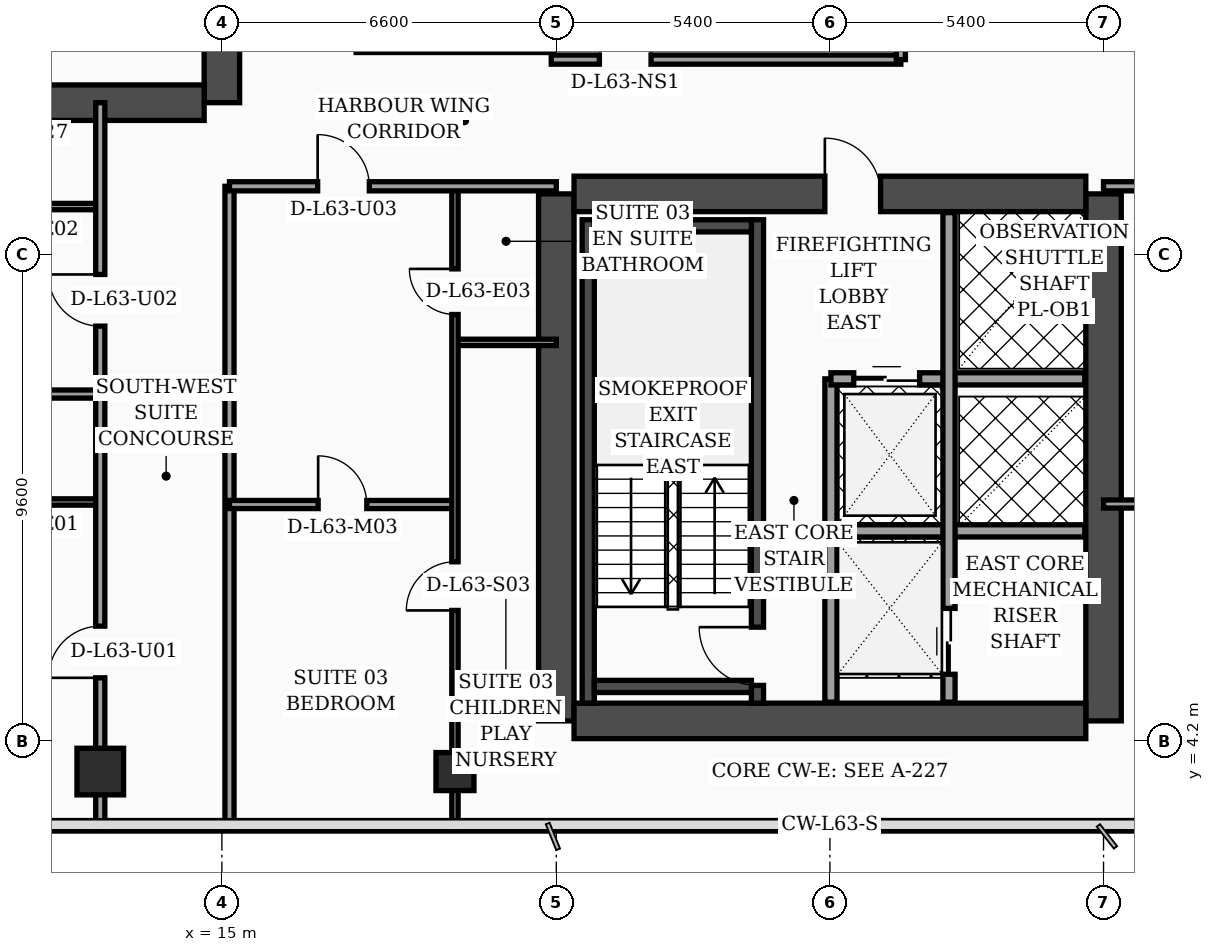
"""IFC4 building model, lengths in metres.
Left out: names, types, materials, properties, quantities, classifications, styles, units other than length and angle.
Written with IfcOpenShell. Run it as: python <this file> out.ifc"""

import sys

from ifc_helpers import new_model, si_unit, direction, frame, frame_2d, origin, origin_2d, place, context, subcontext, project, spatial, rectangle, hollow_rectangle, extrude, element, fill, save


model = new_model("IFC4")
c1 = context("Model", 3, precision=1e-05, world=origin(), true_north=direction((0.0, 1.0)))
c2 = subcontext(c1, "Body", "Model", "MODEL_VIEW")
j1 = project(units=[si_unit("LENGTHUNIT", "METRE"), si_unit("PLANEANGLEUNIT", "RADIAN")], contexts=[c1])
p1 = place(None, origin())
s1 = spatial("IfcSite", under=j1, at=p1, CompositionType="ELEMENT")
p2 = place(p1, origin())
s2 = spatial("IfcBuilding", under=s1, at=p2, CompositionType="ELEMENT")
p3 = place(p2, frame((0.0, 0.0, 255.2)))
s3 = spatial("IfcBuildingStorey", under=s2, at=p3, CompositionType="ELEMENT", Elevation=255.2)
p4 = place(p3, frame((15.0, 16.8, 0.0), z_axis=(0.0, 0.0, 1.0), x_axis=(0.0, 1.0, 0.0)))
e1 = element("IfcWall", 1, at=p4, inside=s3, PredefinedType="SHEAR", context=c2, shape_type="SweptSolid", body=[
    extrude(rectangle(XDim=21.6, YDim=0.7, at=frame_2d((10.8, 0.0))), origin(), (0.0, 0.0, 1.0), 3.56),
])
p5 = place(p4, frame((8.65, 0.0, 0.0)))
e2 = element("IfcOpeningElement", 2, at=p5, cuts=e1, PredefinedType="OPENING", context=c2, shape_type="SweptSolid", body=[
    extrude(rectangle(XDim=1.1, YDim=2.2, at=frame_2d((0.55, 1.1))), frame((0.0, 0.36, 0.0), z_axis=(0.0, -1.0, 0.0), x_axis=(1.0, 0.0, 0.0)), (0.0, 0.0, 1.0), 0.72),
])
p6 = place(p4, frame((18.9, 0.0, 0.0)))
e3 = element("IfcOpeningElement", 3, at=p6, cuts=e1, PredefinedType="OPENING", context=c2, shape_type="SweptSolid", body=[
    extrude(rectangle(XDim=1.1, YDim=2.2, at=frame_2d((0.55, 1.1))), frame((0.0, 0.36, 0.0), z_axis=(0.0, -1.0, 0.0), x_axis=(1.0, 0.0, 0.0)), (0.0, 0.0, 1.0), 0.72),
])
p7 = place(p3, frame((4.55, 16.8, 0.0), z_axis=(0.0, 0.0, 1.0), x_axis=(1.0, 0.0, 0.0)))
e4 = element("IfcWall", 4, at=p7, inside=s3, PredefinedType="SHEAR", context=c2, shape_type="SweptSolid", body=[
    extrude(rectangle(XDim=10.1, YDim=0.7, at=frame_2d((5.05, 0.0))), origin(), (0.0, 0.0, 1.0), 3.56),
])
for number, where, z_axis, x_axis in (
    (5, (21.6, 4.6, 0.0), (0.0, 0.0, 1.0), (0.0, 1.0, 0.0)),
    (6, (32.4, 4.6, 0.0), (0.0, 0.0, 1.0), (0.0, 1.0, 0.0)),
):
    element("IfcWall", number, at=place(p3, frame(where, z_axis=z_axis, x_axis=x_axis)), inside=s3, PredefinedType="SHEAR", context=c2, shape_type="SweptSolid", body=[
        extrude(rectangle(XDim=10.4, YDim=0.7, at=frame_2d((5.2, 0.0))), origin(), (0.0, 0.0, 1.0), 3.56),
    ])
p8 = place(p3, frame((21.95, 15.0, 0.0), z_axis=(0.0, 0.0, 1.0), x_axis=(1.0, 0.0, 0.0)))
e7 = element("IfcWall", 7, at=p8, inside=s3, PredefinedType="SHEAR", context=c2, shape_type="SweptSolid", body=[
    extrude(rectangle(XDim=10.1, YDim=0.7, at=frame_2d((5.05, 0.0))), origin(), (0.0, 0.0, 1.0), 3.56),
])
p9 = place(p8, frame((4.95, 0.0, 0.0)))
e8 = element("IfcOpeningElement", 8, at=p9, cuts=e7, PredefinedType="OPENING", context=c2, shape_type="SweptSolid", body=[
    extrude(rectangle(XDim=1.1, YDim=2.2, at=frame_2d((0.55, 1.1))), frame((0.0, 0.36, 0.0), z_axis=(0.0, -1.0, 0.0), x_axis=(1.0, 0.0, 0.0)), (0.0, 0.0, 1.0), 0.72),
])
p10 = place(p3, frame((21.95, 4.6, 0.0), z_axis=(0.0, 0.0, 1.0), x_axis=(1.0, 0.0, 0.0)))
e9 = element("IfcWall", 9, at=p10, inside=s3, PredefinedType="SHEAR", context=c2, shape_type="SweptSolid", body=[
    extrude(rectangle(XDim=10.1, YDim=0.7, at=frame_2d((5.05, 0.0))), origin(), (0.0, 0.0, 1.0), 3.56),
])
p11 = place(p3, frame((22.23, 4.95, 0.0), z_axis=(0.0, 0.0, 1.0), x_axis=(0.0, 1.0, 0.0)))
e10 = element("IfcWall", 10, at=p11, inside=s3, PredefinedType="SOLIDWALL", context=c2, shape_type="SweptSolid", body=[
    extrude(rectangle(XDim=9.54, YDim=0.24, at=frame_2d((4.77, 0.0))), origin(), (0.0, 0.0, 1.0), 3.56),
])
p12 = place(p3, frame((25.57, 4.95, 0.0), z_axis=(0.0, 0.0, 1.0), x_axis=(0.0, 1.0, 0.0)))
e11 = element("IfcWall", 11, at=p12, inside=s3, PredefinedType="SOLIDWALL", context=c2, shape_type="SweptSolid", body=[
    extrude(rectangle(XDim=9.54, YDim=0.24, at=frame_2d((4.77, 0.0))), origin(), (0.0, 0.0, 1.0), 3.56),
])
p13 = place(p12, frame((0.35, 0.0, 0.0)))
e12 = element("IfcOpeningElement", 12, at=p13, cuts=e11, PredefinedType="OPENING", context=c2, shape_type="SweptSolid", body=[
    extrude(rectangle(XDim=1.15, YDim=2.2, at=frame_2d((0.575, 1.1))), frame((0.0, 0.13, 0.0), z_axis=(0.0, -1.0, 0.0), x_axis=(1.0, 0.0, 0.0)), (0.0, 0.0, 1.0), 0.26),
])
for number, where, z_axis, x_axis in (
    (13, (22.35, 5.28, 0.0), (0.0, 0.0, 1.0), (1.0, 0.0, 0.0)),
    (14, (22.35, 14.37, 0.0), (0.0, 0.0, 1.0), (1.0, 0.0, 0.0)),
):
    element("IfcWall", number, at=place(p3, frame(where, z_axis=z_axis, x_axis=x_axis)), inside=s3, PredefinedType="SOLIDWALL", context=c2, shape_type="SweptSolid", body=[
        extrude(rectangle(XDim=3.1, YDim=0.24, at=frame_2d((1.55, 0.0))), origin(), (0.0, 0.0, 1.0), 3.56),
    ])
p14 = place(p3, frame((12.6, 3.6, 0.0), z_axis=(0.0, 0.0, 1.0), x_axis=(1.0, 0.0, 0.0)))
e15 = element("IfcColumn", 15, at=p14, inside=s3, PredefinedType="COLUMN", context=c2, shape_type="SweptSolid", body=[
    extrude(rectangle(XDim=0.92, YDim=0.92, at=origin_2d()), origin(), (0.0, 0.0, 1.0), 3.56),
])
p15 = place(p3, frame((19.6, 3.6, 0.0), z_axis=(0.0, 0.0, 1.0), x_axis=(1.0, 0.0, 0.0)))
e16 = element("IfcColumn", 16, at=p15, inside=s3, PredefinedType="COLUMN", context=c2, shape_type="SweptSolid", body=[
    extrude(hollow_rectangle(XDim=0.75, YDim=0.75, WallThickness=0.032, at=origin_2d()), origin(), (0.0, 0.0, 1.0), 3.56),
])
p16 = place(p3, frame((27.02, 4.97, 0.0), z_axis=(0.0, 0.0, 1.0), x_axis=(0.0, 1.0, 0.0)))
e17 = element("IfcWall", 17, at=p16, inside=s3, PredefinedType="SOLIDWALL", context=c2, shape_type="SweptSolid", body=[
    extrude(rectangle(XDim=6.38, YDim=0.24, at=frame_2d((3.19, 0.0))), origin(), (0.0, 0.0, 1.0), 3.56),
])
p17 = place(p3, frame((27.02, 11.35, 0.0), z_axis=(0.0, 0.0, 1.0), x_axis=(1.0, 0.0, 0.0)))
e18 = element("IfcWall", 18, at=p17, inside=s3, PredefinedType="SOLIDWALL", context=c2, shape_type="SweptSolid", body=[
    extrude(rectangle(XDim=5.01, YDim=0.24, at=frame_2d((2.505, 0.0))), origin(), (0.0, 0.0, 1.0), 3.56),
])
p18 = place(p17, frame((0.45, 0.0, 0.0)))
e19 = element("IfcOpeningElement", 19, at=p18, cuts=e18, PredefinedType="OPENING", context=c2, shape_type="SweptSolid", body=[
    extrude(rectangle(XDim=1.3, YDim=2.35, at=frame_2d((0.65, 1.175))), frame((0.0, 0.13, 0.0), z_axis=(0.0, -1.0, 0.0), x_axis=(1.0, 0.0, 0.0)), (0.0, 0.0, 1.0), 0.26),
])
p19 = place(p3, frame((27.02, 8.35, 0.0), z_axis=(0.0, 0.0, 1.0), x_axis=(1.0, 0.0, 0.0)))
e20 = element("IfcWall", 20, at=p19, inside=s3, PredefinedType="SOLIDWALL", context=c2, shape_type="SweptSolid", body=[
    extrude(rectangle(XDim=5.01, YDim=0.24, at=frame_2d((2.505, 0.0))), origin(), (0.0, 0.0, 1.0), 3.56),
])
p20 = place(p3, frame((29.35, 4.97, 0.0), z_axis=(0.0, 0.0, 1.0), x_axis=(0.0, 1.0, 0.0)))
e21 = element("IfcWall", 21, at=p20, inside=s3, PredefinedType="SOLIDWALL", context=c2, shape_type="SweptSolid", body=[
    extrude(rectangle(XDim=9.66, YDim=0.24, at=frame_2d((4.83, 0.0))), origin(), (0.0, 0.0, 1.0), 3.56),
])
p21 = place(p20, frame((0.55, 0.0, 0.0)))
e22 = element("IfcOpeningElement", 22, at=p21, cuts=e21, PredefinedType="OPENING", context=c2, shape_type="SweptSolid", body=[
    extrude(rectangle(XDim=1.3, YDim=2.35, at=frame_2d((0.65, 1.175))), frame((0.0, 0.13, 0.0), z_axis=(0.0, -1.0, 0.0), x_axis=(1.0, 0.0, 0.0)), (0.0, 0.0, 1.0), 0.26),
])
p22 = place(p3, frame((3.2, 8.92, 0.0), z_axis=(0.0, 0.0, 1.0), x_axis=(1.0, 0.0, 0.0)))
e23 = element("IfcWall", 23, at=p22, inside=s3, PredefinedType="PARTITIONING", context=c2, shape_type="SweptSolid", body=[
    extrude(rectangle(XDim=9.4, YDim=0.125, at=frame_2d((4.7, 0.0))), origin(), (0.0, 0.0, 1.0), 2.99),
])
p23 = place(p22, frame((3.3, 0.0, 0.0)))
e24 = element("IfcOpeningElement", 24, at=p23, cuts=e23, PredefinedType="OPENING", context=c2, shape_type="SweptSolid", body=[
    extrude(rectangle(XDim=0.96, YDim=2.2, at=frame_2d((0.48, 1.1))), frame((0.0, 0.073, 0.0), z_axis=(0.0, -1.0, 0.0), x_axis=(1.0, 0.0, 0.0)), (0.0, 0.0, 1.0), 0.145),
])
p24 = place(p22, frame((7.49, 0.0, 0.0)))
e25 = element("IfcOpeningElement", 25, at=p24, cuts=e23, PredefinedType="OPENING", context=c2, shape_type="SweptSolid", body=[
    extrude(rectangle(XDim=0.9, YDim=2.15, at=frame_2d((0.45, 1.075))), frame((0.0, 0.073, 0.0), z_axis=(0.0, -1.0, 0.0), x_axis=(1.0, 0.0, 0.0)), (0.0, 0.0, 1.0), 0.145),
])
p25 = place(p3, frame((0.08, 14.75, 0.0), z_axis=(0.0, 0.0, 1.0), x_axis=(1.0, 0.0, 0.0)))
e26 = element("IfcWall", 26, at=p25, inside=s3, PredefinedType="PARTITIONING", context=c2, shape_type="SweptSolid", body=[
    extrude(rectangle(XDim=12.52, YDim=0.125, at=frame_2d((6.26, 0.0))), origin(), (0.0, 0.0, 1.0), 2.99),
])
p26 = place(p25, frame((4.32, 0.0, 0.0)))
e27 = element("IfcOpeningElement", 27, at=p26, cuts=e26, PredefinedType="OPENING", context=c2, shape_type="SweptSolid", body=[
    extrude(rectangle(XDim=0.96, YDim=2.2, at=frame_2d((0.48, 1.1))), frame((0.0, 0.073, 0.0), z_axis=(0.0, -1.0, 0.0), x_axis=(1.0, 0.0, 0.0)), (0.0, 0.0, 1.0), 0.145),
])
p27 = place(p25, frame((10.61, 0.0, 0.0)))
e28 = element("IfcOpeningElement", 28, at=p27, cuts=e26, PredefinedType="OPENING", context=c2, shape_type="SweptSolid", body=[
    extrude(rectangle(XDim=0.9, YDim=2.15, at=frame_2d((0.45, 1.075))), frame((0.0, 0.073, 0.0), z_axis=(0.0, -1.0, 0.0), x_axis=(1.0, 0.0, 0.0)), (0.0, 0.0, 1.0), 0.145),
])
p28 = place(p3, frame((0.08, 11.05, 0.0), z_axis=(0.0, 0.0, 1.0), x_axis=(1.0, 0.0, 0.0)))
e29 = element("IfcWall", 29, at=p28, inside=s3, PredefinedType="PARTITIONING", context=c2, shape_type="SweptSolid", body=[
    extrude(rectangle(XDim=12.52, YDim=0.16, at=frame_2d((6.26, 0.0))), origin(), (0.0, 0.0, 1.0), 2.99),
])
p29 = place(p3, frame((12.6, 2.44, 0.0), z_axis=(0.0, 0.0, 1.0), x_axis=(0.0, 1.0, 0.0)))
e30 = element("IfcWall", 30, at=p29, inside=s3, PredefinedType="PARTITIONING", context=c2, shape_type="SweptSolid", body=[
    extrude(rectangle(XDim=14.36, YDim=0.18, at=frame_2d((7.18, 0.0))), origin(), (0.0, 0.0, 1.0), 2.99),
])
p30 = place(p29, frame((3.01, 0.0, 0.0)))
e31 = element("IfcOpeningElement", 31, at=p30, cuts=e30, PredefinedType="OPENING", context=c2, shape_type="SweptSolid", body=[
    extrude(rectangle(XDim=1.02, YDim=2.2, at=frame_2d((0.51, 1.1))), frame((0.0, 0.1, 0.0), z_axis=(0.0, -1.0, 0.0), x_axis=(1.0, 0.0, 0.0)), (0.0, 0.0, 1.0), 0.2),
])
p31 = place(p29, frame((9.95, 0.0, 0.0)))
e32 = element("IfcOpeningElement", 32, at=p31, cuts=e30, PredefinedType="OPENING", context=c2, shape_type="SweptSolid", body=[
    extrude(rectangle(XDim=1.02, YDim=2.2, at=frame_2d((0.51, 1.1))), frame((0.0, 0.1, 0.0), z_axis=(0.0, -1.0, 0.0), x_axis=(1.0, 0.0, 0.0)), (0.0, 0.0, 1.0), 0.2),
])
p32 = place(p3, frame((15.15, 2.44, 0.0), z_axis=(0.0, 0.0, 1.0), x_axis=(0.0, 1.0, 0.0)))
e33 = element("IfcWall", 33, at=p32, inside=s3, PredefinedType="PARTITIONING", context=c2, shape_type="SweptSolid", body=[
    extrude(rectangle(XDim=12.71, YDim=0.18, at=frame_2d((6.355, 0.0))), origin(), (0.0, 0.0, 1.0), 3.09),
])
p33 = place(p3, frame((19.6, 12.07, 0.0), z_axis=(0.0, 0.0, 1.0), x_axis=(1.0, 0.0, 0.0)))
e34 = element("IfcWall", 34, at=p33, inside=s3, PredefinedType="PARTITIONING", context=c2, shape_type="SweptSolid", body=[
    extrude(rectangle(XDim=2.0, YDim=0.125, at=frame_2d((1.0, 0.0))), origin(), (0.0, 0.0, 1.0), 3.56),
])
p34 = place(p3, frame((15.15, 8.87, 0.0), z_axis=(0.0, 0.0, 1.0), x_axis=(1.0, 0.0, 0.0)))
e35 = element("IfcWall", 35, at=p34, inside=s3, PredefinedType="PARTITIONING", context=c2, shape_type="SweptSolid", body=[
    extrude(rectangle(XDim=4.45, YDim=0.16, at=frame_2d((2.225, 0.0))), origin(), (0.0, 0.0, 1.0), 3.56),
])
p35 = place(p34, frame((1.75, 0.0, 0.0)))
e36 = element("IfcOpeningElement", 36, at=p35, cuts=e35, PredefinedType="OPENING", context=c2, shape_type="SweptSolid", body=[
    extrude(rectangle(XDim=0.96, YDim=2.2, at=frame_2d((0.48, 1.1))), frame((0.0, 0.09, 0.0), z_axis=(0.0, -1.0, 0.0), x_axis=(1.0, 0.0, 0.0)), (0.0, 0.0, 1.0), 0.18),
])
p36 = place(p3, frame((19.6, 2.44, 0.0), z_axis=(0.0, 0.0, 1.0), x_axis=(0.0, 1.0, 0.0)))
e37 = element("IfcWall", 37, at=p36, inside=s3, PredefinedType="PARTITIONING", context=c2, shape_type="SweptSolid", body=[
    extrude(rectangle(XDim=12.71, YDim=0.125, at=frame_2d((6.355, 0.0))), origin(), (0.0, 0.0, 1.0), 2.59),
])
p37 = place(p36, frame((4.34, 0.0, 0.0)))
e38 = element("IfcOpeningElement", 38, at=p37, cuts=e37, PredefinedType="OPENING", context=c2, shape_type="SweptSolid", body=[
    extrude(rectangle(XDim=0.96, YDim=2.2, at=frame_2d((0.48, 1.1))), frame((0.0, 0.073, 0.0), z_axis=(0.0, -1.0, 0.0), x_axis=(1.0, 0.0, 0.0)), (0.0, 0.0, 1.0), 0.145),
])
p38 = place(p36, frame((10.18, 0.0, 0.0)))
e39 = element("IfcOpeningElement", 39, at=p38, cuts=e37, PredefinedType="OPENING", context=c2, shape_type="SweptSolid", body=[
    extrude(rectangle(XDim=0.9, YDim=2.15, at=frame_2d((0.45, 1.075))), frame((0.0, 0.073, 0.0), z_axis=(0.0, -1.0, 0.0), x_axis=(1.0, 0.0, 0.0)), (0.0, 0.0, 1.0), 0.145),
])
p39 = place(p3, frame((15.15, 15.15, 0.0), z_axis=(0.0, 0.0, 1.0), x_axis=(1.0, 0.0, 0.0)))
e40 = element("IfcWall", 40, at=p39, inside=s3, PredefinedType="PARTITIONING", context=c2, shape_type="SweptSolid", body=[
    extrude(rectangle(XDim=6.45, YDim=0.18, at=frame_2d((3.225, 0.0))), origin(), (0.0, 0.0, 1.0), 2.59),
])
p40 = place(p39, frame((1.74, 0.0, 0.0)))
e41 = element("IfcOpeningElement", 41, at=p40, cuts=e40, PredefinedType="OPENING", context=c2, shape_type="SweptSolid", body=[
    extrude(rectangle(XDim=1.02, YDim=2.2, at=frame_2d((0.51, 1.1))), frame((0.0, 0.1, 0.0), z_axis=(0.0, -1.0, 0.0), x_axis=(1.0, 0.0, 0.0)), (0.0, 0.0, 1.0), 0.2),
])
p41 = place(p3, frame((17.65, 17.88, 0.0), z_axis=(0.0, 0.0, 1.0), x_axis=(1.0, 0.0, 0.0)))
e42 = element("IfcWall", 42, at=p41, inside=s3, PredefinedType="PARTITIONING", context=c2, shape_type="SweptSolid", body=[
    extrude(rectangle(XDim=3.9, YDim=0.18, at=frame_2d((1.95, 0.0))), origin(), (0.0, 0.0, 1.0), 3.56),
])
p42 = place(p3, frame((32.4, 8.88, 0.0), z_axis=(0.0, 0.0, 1.0), x_axis=(1.0, 0.0, 0.0)))
e43 = element("IfcWall", 43, at=p42, inside=s3, PredefinedType="PARTITIONING", context=c2, shape_type="SweptSolid", body=[
    extrude(rectangle(XDim=5.49, YDim=0.16, at=frame_2d((2.745, 0.0))), origin(), (0.0, 0.0, 1.0), 2.99),
])
p43 = place(p42, frame((2.27, 0.0, 0.0)))
e44 = element("IfcOpeningElement", 44, at=p43, cuts=e43, PredefinedType="OPENING", context=c2, shape_type="SweptSolid", body=[
    extrude(rectangle(XDim=0.96, YDim=2.2, at=frame_2d((0.48, 1.1))), frame((0.0, 0.09, 0.0), z_axis=(0.0, -1.0, 0.0), x_axis=(1.0, 0.0, 0.0)), (0.0, 0.0, 1.0), 0.18),
])
p44 = place(p3, frame((32.4, 15.15, 0.0), z_axis=(0.0, 0.0, 1.0), x_axis=(1.0, 0.0, 0.0)))
e45 = element("IfcWall", 45, at=p44, inside=s3, PredefinedType="PARTITIONING", context=c2, shape_type="SweptSolid", body=[
    extrude(rectangle(XDim=7.6, YDim=0.18, at=frame_2d((3.8, 0.0))), origin(), (0.0, 0.0, 1.0), 2.99),
])
p45 = place(p44, frame((2.33, 0.0, 0.0)))
e46 = element("IfcOpeningElement", 46, at=p45, cuts=e45, PredefinedType="OPENING", context=c2, shape_type="SweptSolid", body=[
    extrude(rectangle(XDim=1.02, YDim=2.2, at=frame_2d((0.51, 1.1))), frame((0.0, 0.1, 0.0), z_axis=(0.0, -1.0, 0.0), x_axis=(1.0, 0.0, 0.0)), (0.0, 0.0, 1.0), 0.2),
])
p46 = place(p3, frame((21.5, 17.65, 0.0), z_axis=(0.0, 0.0, 1.0), x_axis=(1.0, 0.0, 0.0)))
e47 = element("IfcWall", 47, at=p46, inside=s3, PredefinedType="PARTITIONING", context=c2, shape_type="SweptSolid", body=[
    extrude(rectangle(XDim=6.9, YDim=0.18, at=frame_2d((3.45, 0.0))), origin(), (0.0, 0.0, 1.0), 2.99),
])
p47 = place(p46, frame((0.95, 0.0, 0.0)))
e48 = element("IfcOpeningElement", 48, at=p47, cuts=e47, PredefinedType="OPENING", context=c2, shape_type="SweptSolid", body=[
    extrude(rectangle(XDim=1.02, YDim=2.2, at=frame_2d((0.51, 1.1))), frame((0.0, 0.1, 0.0), z_axis=(0.0, -1.0, 0.0), x_axis=(1.0, 0.0, 0.0)), (0.0, 0.0, 1.0), 0.2),
])
p48 = place(p3, frame((28.4, 17.65, 0.0), z_axis=(0.0, 0.0, 1.0), x_axis=(0.0, 1.0, 0.0)))
e49 = element("IfcWall", 49, at=p48, inside=s3, PredefinedType="PARTITIONING", context=c2, shape_type="SweptSolid", body=[
    extrude(rectangle(XDim=14.67, YDim=0.18, at=frame_2d((7.335, 0.0))), origin(), (0.0, 0.0, 1.0), 2.99),
])
p49 = place(p18, origin())
e50 = element("IfcDoor", 50, at=p49, inside=s3, OperationType="DOUBLE_DOOR_SLIDING", PredefinedType="DOOR", context=c2, shape_type="SweptSolid", body=[
    extrude(rectangle(XDim=1.3, YDim=2.35, at=frame_2d((0.65, 1.175))), frame((0.0, 0.025, 0.0), z_axis=(0.0, -1.0, 0.0), x_axis=(1.0, 0.0, 0.0)), (0.0, 0.0, 1.0), 0.05),
])
fill(e19, e50)
p50 = place(p21, origin())
e51 = element("IfcDoor", 51, at=p50, inside=s3, OperationType="DOUBLE_DOOR_SLIDING", PredefinedType="DOOR", context=c2, shape_type="SweptSolid", body=[
    extrude(rectangle(XDim=1.3, YDim=2.35, at=frame_2d((0.65, 1.175))), frame((0.0, 0.025, 0.0), z_axis=(0.0, -1.0, 0.0), x_axis=(1.0, 0.0, 0.0)), (0.0, 0.0, 1.0), 0.05),
])
fill(e22, e51)
p51 = place(p30, origin())
e52 = element("IfcDoor", 52, at=p51, inside=s3, OperationType="SINGLE_SWING_LEFT", PredefinedType="DOOR", context=c2, shape_type="SweptSolid", body=[
    extrude(rectangle(XDim=1.02, YDim=2.2, at=frame_2d((0.51, 1.1))), frame((0.0, 0.025, 0.0), z_axis=(0.0, -1.0, 0.0), x_axis=(1.0, 0.0, 0.0)), (0.0, 0.0, 1.0), 0.05),
])
fill(e31, e52)
p52 = place(p31, origin())
e53 = element("IfcDoor", 53, at=p52, inside=s3, OperationType="SINGLE_SWING_RIGHT", PredefinedType="DOOR", context=c2, shape_type="SweptSolid", body=[
    extrude(rectangle(XDim=1.02, YDim=2.2, at=frame_2d((0.51, 1.1))), frame((0.0, 0.025, 0.0), z_axis=(0.0, -1.0, 0.0), x_axis=(1.0, 0.0, 0.0)), (0.0, 0.0, 1.0), 0.05),
])
fill(e32, e53)
p53 = place(p35, origin())
e54 = element("IfcDoor", 54, at=p53, inside=s3, OperationType="SINGLE_SWING_LEFT", PredefinedType="DOOR", context=c2, shape_type="SweptSolid", body=[
    extrude(rectangle(XDim=0.96, YDim=2.2, at=frame_2d((0.48, 1.1))), frame((0.0, 0.025, 0.0), z_axis=(0.0, -1.0, 0.0), x_axis=(1.0, 0.0, 0.0)), (0.0, 0.0, 1.0), 0.05),
])
fill(e36, e54)
p54 = place(p37, origin())
e55 = element("IfcDoor", 55, at=p54, inside=s3, OperationType="SINGLE_SWING_LEFT", PredefinedType="DOOR", context=c2, shape_type="SweptSolid", body=[
    extrude(rectangle(XDim=0.96, YDim=2.2, at=frame_2d((0.48, 1.1))), frame((0.0, 0.025, 0.0), z_axis=(0.0, -1.0, 0.0), x_axis=(1.0, 0.0, 0.0)), (0.0, 0.0, 1.0), 0.05),
])
fill(e38, e55)
p55 = place(p38, origin())
e56 = element("IfcDoor", 56, at=p55, inside=s3, OperationType="SINGLE_SWING_RIGHT", PredefinedType="DOOR", context=c2, shape_type="SweptSolid", body=[
    extrude(rectangle(XDim=0.9, YDim=2.15, at=frame_2d((0.45, 1.075))), frame((0.0, 0.025, 0.0), z_axis=(0.0, -1.0, 0.0), x_axis=(1.0, 0.0, 0.0)), (0.0, 0.0, 1.0), 0.05),
])
fill(e39, e56)
p56 = place(p40, origin())
e57 = element("IfcDoor", 57, at=p56, inside=s3, OperationType="SINGLE_SWING_LEFT", PredefinedType="DOOR", context=c2, shape_type="SweptSolid", body=[
    extrude(rectangle(XDim=1.02, YDim=2.2, at=frame_2d((0.51, 1.1))), frame((0.0, 0.025, 0.0), z_axis=(0.0, -1.0, 0.0), x_axis=(1.0, 0.0, 0.0)), (0.0, 0.0, 1.0), 0.05),
])
fill(e41, e57)
p57 = place(p47, origin())
e58 = element("IfcDoor", 58, at=p57, inside=s3, OperationType="SINGLE_SWING_RIGHT", PredefinedType="DOOR", context=c2, shape_type="SweptSolid", body=[
    extrude(rectangle(XDim=1.02, YDim=2.2, at=frame_2d((0.51, 1.1))), frame((0.0, 0.025, 0.0), z_axis=(0.0, -1.0, 0.0), x_axis=(1.0, 0.0, 0.0)), (0.0, 0.0, 1.0), 0.05),
])
fill(e48, e58)
p58 = place(p13, origin())
e59 = element("IfcDoor", 59, at=p58, inside=s3, OperationType="SINGLE_SWING_RIGHT", PredefinedType="DOOR", context=c2, shape_type="SweptSolid", body=[
    extrude(rectangle(XDim=1.15, YDim=2.2, at=frame_2d((0.575, 1.1))), frame((0.0, 0.025, 0.0), z_axis=(0.0, -1.0, 0.0), x_axis=(1.0, 0.0, 0.0)), (0.0, 0.0, 1.0), 0.05),
])
fill(e12, e59)
p59 = place(p9, origin())
e60 = element("IfcDoor", 60, at=p59, inside=s3, OperationType="SINGLE_SWING_LEFT", PredefinedType="DOOR", context=c2, shape_type="SweptSolid", body=[
    extrude(rectangle(XDim=1.1, YDim=2.2, at=frame_2d((0.55, 1.1))), frame((0.0, 0.025, 0.0), z_axis=(0.0, -1.0, 0.0), x_axis=(1.0, 0.0, 0.0)), (0.0, 0.0, 1.0), 0.05),
])
fill(e8, e60)
save(model, sys.argv[1])
